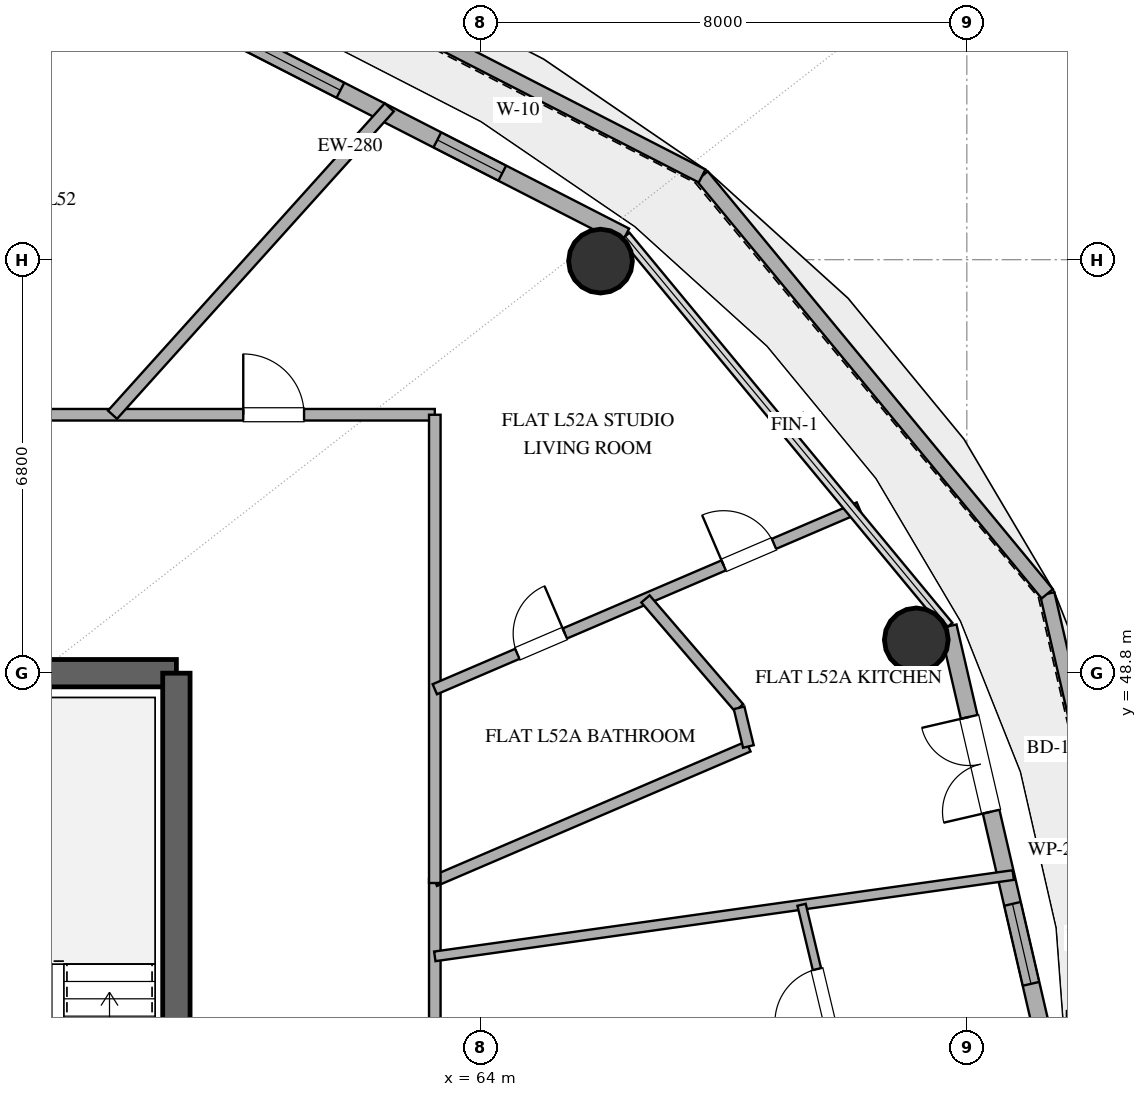
"""IFC4 building model, lengths in metres.
Left out: names, types, materials, properties, quantities, classifications, styles, units other than length and angle.
Written with IfcOpenShell. Run it as: python <this file> out.ifc"""

import sys

from ifc_helpers import new_model, si_unit, direction, frame, frame_2d, origin, origin_2d, place, context, subcontext, project, spatial, rectangle, hollow_circle, extrude, element, fill, save


model = new_model("IFC4")
c1 = context("Model", 3, precision=1e-05, world=origin(), true_north=direction((0.0, 1.0)))
c2 = subcontext(c1, "Body", "Model", "MODEL_VIEW")
j1 = project(units=[si_unit("LENGTHUNIT", "METRE"), si_unit("PLANEANGLEUNIT", "RADIAN")], contexts=[c1])
p1 = place(None, origin())
s1 = spatial("IfcSite", under=j1, at=p1, CompositionType="ELEMENT")
p2 = place(p1, origin())
s2 = spatial("IfcBuilding", under=s1, at=p2, CompositionType="ELEMENT")
p3 = place(p2, frame((0.0, 0.0, 206.4)))
s3 = spatial("IfcBuildingStorey", under=s2, at=p3, CompositionType="ELEMENT", Elevation=206.4)
p4 = place(p3, frame((55.0, 48.8, 0.0), z_axis=(0.0, 0.0, 1.0), x_axis=(1.0, 0.0, 0.0)))
e1 = element("IfcWall", 1, at=p4, inside=s3, PredefinedType="SHEAR", context=c2, shape_type="SweptSolid", body=[
    extrude(rectangle(XDim=4.0, YDim=0.45, at=frame_2d((2.0, 0.0))), origin(), (0.0, 0.0, 1.0), 3.36),
])
p5 = place(p3, frame((59.0, 35.2, 0.0), z_axis=(0.0, 0.0, 1.0), x_axis=(0.0, 1.0, 0.0)))
e2 = element("IfcWall", 2, at=p5, inside=s3, PredefinedType="SHEAR", context=c2, shape_type="SweptSolid", body=[
    extrude(rectangle(XDim=13.6, YDim=0.45, at=frame_2d((6.8, 0.0))), origin(), (0.0, 0.0, 1.0), 3.36),
])
for number, where, z_axis, x_axis in (
    (3, (71.169, 49.347, 0.0), (0.0, 0.0, 1.0), (1.0, 0.0, 0.0)),
    (4, (65.975, 55.576, 0.0), (0.0, 0.0, 1.0), (1.0, 0.0, 0.0)),
):
    element("IfcColumn", number, at=place(p3, frame(where, z_axis=z_axis, x_axis=x_axis)), inside=s3, PredefinedType="COLUMN", context=c2, shape_type="SweptSolid", body=[
        extrude(hollow_circle(Radius=0.525, WallThickness=0.028, at=origin_2d()), origin(), (0.0, 0.0, 1.0), 3.36),
    ])
p6 = place(p3, frame((75.197, 42.0, 0.0), z_axis=(0.0, 0.0, 1.0), x_axis=(-0.225241005172, 0.974303078918, 0.0)))
e5 = element("IfcWall", 5, at=p6, inside=s3, PredefinedType="PARAPET", context=c2, shape_type="SweptSolid", body=[
    extrude(rectangle(XDim=8.319, YDim=0.24, at=frame_2d((4.16, 0.0))), origin(), (0.0, 0.0, 1.0), 1.25),
])
p7 = place(p3, frame((73.323, 50.105, 0.0), z_axis=(0.0, 0.0, 1.0), x_axis=(-0.636894188862, 0.770951225561, 0.0)))
e6 = element("IfcWall", 6, at=p7, inside=s3, PredefinedType="PARAPET", context=c2, shape_type="SweptSolid", body=[
    extrude(rectangle(XDim=8.913, YDim=0.24, at=frame_2d((4.457, 0.0))), origin(), (0.0, 0.0, 1.0), 1.25),
])
p8 = place(p3, frame((67.646, 56.977, 0.0), z_axis=(0.0, 0.0, 1.0), x_axis=(-0.889652072391, 0.456639015077, 0.0)))
e7 = element("IfcWall", 7, at=p8, inside=s3, PredefinedType="PARAPET", context=c2, shape_type="SweptSolid", body=[
    extrude(rectangle(XDim=10.055, YDim=0.24, at=frame_2d((5.027, 0.0))), origin(), (0.0, 0.0, 1.0), 1.25),
])
p9 = place(p3, frame((73.447, 42.0, 0.0), z_axis=(0.0, 0.0, 1.0), x_axis=(-0.225635078214, 0.974211892495, 0.0)))
e8 = element("IfcWall", 8, at=p9, inside=s3, PredefinedType="SOLIDWALL", context=c2, shape_type="SweptSolid", body=[
    extrude(rectangle(XDim=7.77, YDim=0.28, at=frame_2d((3.885, 0.0))), origin(), (0.0, 0.0, 1.0), 3.36),
])
p10 = place(p9, frame((1.736, 0.0, 0.85)))
e9 = element("IfcOpeningElement", 9, at=p10, cuts=e8, PredefinedType="OPENING", context=c2, shape_type="SweptSolid", body=[
    extrude(rectangle(XDim=1.35, YDim=1.8, at=frame_2d((0.675, 0.9))), frame((0.0, 0.15, 0.0), z_axis=(0.0, -1.0, 0.0), x_axis=(1.0, 0.0, 0.0)), (0.0, 0.0, 1.0), 0.3),
])
p11 = place(p9, frame((4.642, 0.0, 0.0)))
e10 = element("IfcOpeningElement", 10, at=p11, cuts=e8, PredefinedType="OPENING", context=c2, shape_type="SweptSolid", body=[
    extrude(rectangle(XDim=1.6, YDim=2.25, at=frame_2d((0.8, 1.125))), frame((0.0, 0.15, 0.0), z_axis=(0.0, -1.0, 0.0), x_axis=(1.0, 0.0, 0.0)), (0.0, 0.0, 1.0), 0.3),
])
p12 = place(p3, frame((66.383, 55.987, 0.0), z_axis=(0.0, 0.0, 1.0), x_axis=(-0.890007394051, 0.455946091699, 0.0)))
e11 = element("IfcWall", 11, at=p12, inside=s3, PredefinedType="SOLIDWALL", context=c2, shape_type="SweptSolid", body=[
    extrude(rectangle(XDim=9.404, YDim=0.28, at=frame_2d((4.702, 0.0))), origin(), (0.0, 0.0, 1.0), 3.36),
])
p13 = place(p12, frame((2.273, 0.0, 0.85)))
e12 = element("IfcOpeningElement", 12, at=p13, cuts=e11, PredefinedType="OPENING", context=c2, shape_type="SweptSolid", body=[
    extrude(rectangle(XDim=1.2, YDim=1.6, at=frame_2d((0.6, 0.8))), frame((0.0, 0.15, 0.0), z_axis=(0.0, -1.0, 0.0), x_axis=(1.0, 0.0, 0.0)), (0.0, 0.0, 1.0), 0.3),
])
p14 = place(p12, frame((5.264, 0.0, 0.85)))
e13 = element("IfcOpeningElement", 13, at=p14, cuts=e11, PredefinedType="OPENING", context=c2, shape_type="SweptSolid", body=[
    extrude(rectangle(XDim=2.1, YDim=2.2, at=frame_2d((1.05, 1.1))), frame((0.0, 0.15, 0.0), z_axis=(0.0, -1.0, 0.0), x_axis=(1.0, 0.0, 0.0)), (0.0, 0.0, 1.0), 0.3),
])
p15 = place(p3, frame((45.931, 53.05, 0.0), z_axis=(0.0, 0.0, 1.0), x_axis=(1.0, 0.0, 0.0)))
e14 = element("IfcWall", 14, at=p15, inside=s3, PredefinedType="PARTITIONING", context=c2, shape_type="SweptSolid", body=[
    extrude(rectangle(XDim=17.319, YDim=0.19, at=frame_2d((8.659, 0.0))), origin(), (0.0, 0.0, 1.0), 2.72),
])
p16 = place(p15, frame((6.935, 0.0, 0.0)))
e15 = element("IfcOpeningElement", 15, at=p16, cuts=e14, PredefinedType="OPENING", context=c2, shape_type="SweptSolid", body=[
    extrude(rectangle(XDim=1.0, YDim=2.2, at=frame_2d((0.5, 1.1))), frame((0.0, 0.105, 0.0), z_axis=(0.0, -1.0, 0.0), x_axis=(1.0, 0.0, 0.0)), (0.0, 0.0, 1.0), 0.21),
])
p17 = place(p15, frame((14.168, 0.0, 0.0)))
e16 = element("IfcOpeningElement", 16, at=p17, cuts=e14, PredefinedType="OPENING", context=c2, shape_type="SweptSolid", body=[
    extrude(rectangle(XDim=1.0, YDim=2.2, at=frame_2d((0.5, 1.1))), frame((0.0, 0.105, 0.0), z_axis=(0.0, -1.0, 0.0), x_axis=(1.0, 0.0, 0.0)), (0.0, 0.0, 1.0), 0.21),
])
p18 = place(p3, frame((57.949, 53.05, 0.0), z_axis=(0.0, 0.0, 1.0), x_axis=(0.66913524162, 0.743140651844, 0.0)))
e17 = element("IfcWall", 17, at=p18, inside=s3, PredefinedType="PARTITIONING", context=c2, shape_type="SweptSolid", body=[
    extrude(rectangle(XDim=6.802, YDim=0.2, at=frame_2d((3.401, 0.0))), origin(), (0.0, 0.0, 1.0), 2.72),
])
p19 = place(p3, frame((63.25, 45.419, 0.0), z_axis=(0.0, 0.0, 1.0), x_axis=(0.0, -1.0, 0.0)))
e18 = element("IfcWall", 18, at=p19, inside=s3, PredefinedType="PARTITIONING", context=c2, shape_type="SweptSolid", body=[
    extrude(rectangle(XDim=14.469, YDim=0.19, at=frame_2d((7.235, 0.0))), origin(), (0.0, 0.0, 1.0), 2.72),
])
p20 = place(p19, frame((10.905, 0.0, 0.0)))
e19 = element("IfcOpeningElement", 19, at=p20, cuts=e18, PredefinedType="OPENING", context=c2, shape_type="SweptSolid", body=[
    extrude(rectangle(XDim=1.0, YDim=2.2, at=frame_2d((0.5, 1.1))), frame((0.0, 0.105, 0.0), z_axis=(0.0, -1.0, 0.0), x_axis=(1.0, 0.0, 0.0)), (0.0, 0.0, 1.0), 0.21),
])
p21 = place(p3, frame((63.25, 44.143, 0.0), z_axis=(0.0, 0.0, 1.0), x_axis=(0.990269661234, 0.139161769316, 0.0)))
e20 = element("IfcWall", 20, at=p21, inside=s3, PredefinedType="PLUMBINGWALL", context=c2, shape_type="SweptSolid", body=[
    extrude(rectangle(XDim=9.607, YDim=0.16, at=frame_2d((4.803, 0.0))), origin(), (0.0, 0.0, 1.0), 2.72),
])
p22 = place(p3, frame((68.407, 47.595, 0.0), z_axis=(0.0, 0.0, 1.0), x_axis=(-0.919138278408, -0.393935051963, 0.0)))
e21 = element("IfcWall", 21, at=p22, inside=s3, PredefinedType="PLUMBINGWALL", context=c2, shape_type="SweptSolid", body=[
    extrude(rectangle(XDim=5.611, YDim=0.18, at=frame_2d((2.806, 0.0))), origin(), (0.0, 0.0, 1.0), 2.72),
])
p23 = place(p3, frame((63.25, 45.35, 0.0), z_axis=(0.0, 0.0, 1.0), x_axis=(0.0, 1.0, 0.0)))
e22 = element("IfcWall", 22, at=p23, inside=s3, PredefinedType="PARTITIONING", context=c2, shape_type="SweptSolid", body=[
    extrude(rectangle(XDim=7.7, YDim=0.19, at=frame_2d((3.85, 0.0))), origin(), (0.0, 0.0, 1.0), 2.72),
])
p24 = place(p3, frame((63.25, 48.536, 0.0), z_axis=(0.0, 0.0, 1.0), x_axis=(0.919133380172, 0.393946480443, 0.0)))
e23 = element("IfcWall", 23, at=p24, inside=s3, PredefinedType="PLUMBINGWALL", context=c2, shape_type="SweptSolid", body=[
    extrude(rectangle(XDim=7.588, YDim=0.18, at=frame_2d((3.794, 0.0))), origin(), (0.0, 0.0, 1.0), 2.72),
])
p25 = place(p24, frame((5.169, 0.0, 0.0)))
e24 = element("IfcOpeningElement", 24, at=p25, cuts=e23, PredefinedType="OPENING", context=c2, shape_type="SweptSolid", body=[
    extrude(rectangle(XDim=0.9, YDim=2.1, at=frame_2d((0.45, 1.05))), frame((0.0, 0.1, 0.0), z_axis=(0.0, -1.0, 0.0), x_axis=(1.0, 0.0, 0.0)), (0.0, 0.0, 1.0), 0.2),
])
p26 = place(p24, frame((1.477, 0.0, 0.0)))
e25 = element("IfcOpeningElement", 25, at=p26, cuts=e23, PredefinedType="OPENING", context=c2, shape_type="SweptSolid", body=[
    extrude(rectangle(XDim=0.85, YDim=2.1, at=frame_2d((0.425, 1.05))), frame((0.0, 0.1, 0.0), z_axis=(0.0, -1.0, 0.0), x_axis=(1.0, 0.0, 0.0)), (0.0, 0.0, 1.0), 0.2),
])
p27 = place(p3, frame((69.996, 42.0, 0.0), z_axis=(0.0, 0.0, 1.0), x_axis=(-0.23230382896, 0.972643270192, 0.0)))
e26 = element("IfcWall", 26, at=p27, inside=s3, PredefinedType="PARTITIONING", context=c2, shape_type="SweptSolid", body=[
    extrude(rectangle(XDim=3.075, YDim=0.14, at=frame_2d((1.538, 0.0))), origin(), (0.0, 0.0, 1.0), 2.72),
])
p28 = place(p27, frame((1.088, 0.0, 0.0)))
e27 = element("IfcOpeningElement", 27, at=p28, cuts=e26, PredefinedType="OPENING", context=c2, shape_type="SweptSolid", body=[
    extrude(rectangle(XDim=0.9, YDim=2.1, at=frame_2d((0.45, 1.05))), frame((0.0, 0.08, 0.0), z_axis=(0.0, -1.0, 0.0), x_axis=(1.0, 0.0, 0.0)), (0.0, 0.0, 1.0), 0.16),
])
p29 = place(p3, frame((66.715, 50.021, 0.0), z_axis=(0.0, 0.0, 1.0), x_axis=(0.651871704999, -0.758329268999, 0.0)))
e28 = element("IfcWall", 28, at=p29, inside=s3, PredefinedType="PLUMBINGWALL", context=c2, shape_type="SweptSolid", body=[
    extrude(rectangle(XDim=2.362, YDim=0.18, at=frame_2d((1.181, 0.0))), origin(), (0.0, 0.0, 1.0), 2.72),
])
p30 = place(p3, frame((68.255, 48.23, 0.0), z_axis=(0.0, 0.0, 1.0), x_axis=(0.233909944351, -0.972258267095, 0.0)))
e29 = element("IfcWall", 29, at=p30, inside=s3, PredefinedType="PLUMBINGWALL", context=c2, shape_type="SweptSolid", body=[
    extrude(rectangle(XDim=0.653, YDim=0.18, at=frame_2d((0.327, 0.0))), origin(), (0.0, 0.0, 1.0), 2.72),
])
p31 = place(p10, origin())
e30 = element("IfcWindow", 30, at=p31, inside=s3, PartitioningType="SINGLE_PANEL", PredefinedType="WINDOW", context=c2, shape_type="SweptSolid", body=[
    extrude(rectangle(XDim=1.35, YDim=1.8, at=frame_2d((0.675, 0.9))), frame((0.0, 0.03, 0.0), z_axis=(0.0, -1.0, 0.0), x_axis=(1.0, 0.0, 0.0)), (0.0, 0.0, 1.0), 0.06),
])
fill(e9, e30)
p32 = place(p11, origin())
e31 = element("IfcDoor", 31, at=p32, inside=s3, OperationType="DOUBLE_DOOR_SINGLE_SWING", PredefinedType="DOOR", context=c2, shape_type="SweptSolid", body=[
    extrude(rectangle(XDim=1.6, YDim=2.25, at=frame_2d((0.8, 1.125))), frame((0.0, 0.025, 0.0), z_axis=(0.0, -1.0, 0.0), x_axis=(1.0, 0.0, 0.0)), (0.0, 0.0, 1.0), 0.05),
])
fill(e10, e31)
p33 = place(p13, origin())
e32 = element("IfcWindow", 32, at=p33, inside=s3, PartitioningType="SINGLE_PANEL", PredefinedType="WINDOW", context=c2, shape_type="SweptSolid", body=[
    extrude(rectangle(XDim=1.2, YDim=1.6, at=frame_2d((0.6, 0.8))), frame((0.0, 0.03, 0.0), z_axis=(0.0, -1.0, 0.0), x_axis=(1.0, 0.0, 0.0)), (0.0, 0.0, 1.0), 0.06),
])
fill(e12, e32)
p34 = place(p14, origin())
e33 = element("IfcWindow", 33, at=p34, inside=s3, PartitioningType="SINGLE_PANEL", PredefinedType="WINDOW", context=c2, shape_type="SweptSolid", body=[
    extrude(rectangle(XDim=2.1, YDim=2.2, at=frame_2d((1.05, 1.1))), frame((0.0, 0.03, 0.0), z_axis=(0.0, -1.0, 0.0), x_axis=(1.0, 0.0, 0.0)), (0.0, 0.0, 1.0), 0.06),
])
fill(e13, e33)
p35 = place(p17, origin())
e34 = element("IfcDoor", 34, at=p35, inside=s3, OperationType="SINGLE_SWING_LEFT", PredefinedType="DOOR", context=c2, shape_type="SweptSolid", body=[
    extrude(rectangle(XDim=1.0, YDim=2.2, at=frame_2d((0.5, 1.1))), frame((0.0, 0.025, 0.0), z_axis=(0.0, -1.0, 0.0), x_axis=(1.0, 0.0, 0.0)), (0.0, 0.0, 1.0), 0.05),
])
fill(e16, e34)
p36 = place(p25, origin())
e35 = element("IfcDoor", 35, at=p36, inside=s3, OperationType="SINGLE_SWING_LEFT", PredefinedType="DOOR", context=c2, shape_type="SweptSolid", body=[
    extrude(rectangle(XDim=0.9, YDim=2.1, at=frame_2d((0.45, 1.05))), frame((0.0, 0.025, 0.0), z_axis=(0.0, -1.0, 0.0), x_axis=(1.0, 0.0, 0.0)), (0.0, 0.0, 1.0), 0.05),
])
fill(e24, e35)
p37 = place(p26, origin())
e36 = element("IfcDoor", 36, at=p37, inside=s3, OperationType="SINGLE_SWING_RIGHT", PredefinedType="DOOR", context=c2, shape_type="SweptSolid", body=[
    extrude(rectangle(XDim=0.85, YDim=2.1, at=frame_2d((0.425, 1.05))), frame((0.0, 0.025, 0.0), z_axis=(0.0, -1.0, 0.0), x_axis=(1.0, 0.0, 0.0)), (0.0, 0.0, 1.0), 0.05),
])
fill(e25, e36)
p38 = place(p28, origin())
e37 = element("IfcDoor", 37, at=p38, inside=s3, OperationType="SINGLE_SWING_LEFT", PredefinedType="DOOR", context=c2, shape_type="SweptSolid", body=[
    extrude(rectangle(XDim=0.9, YDim=2.1, at=frame_2d((0.45, 1.05))), frame((0.0, 0.025, 0.0), z_axis=(0.0, -1.0, 0.0), x_axis=(1.0, 0.0, 0.0)), (0.0, 0.0, 1.0), 0.05),
])
fill(e27, e37)
save(model, sys.argv[1])
